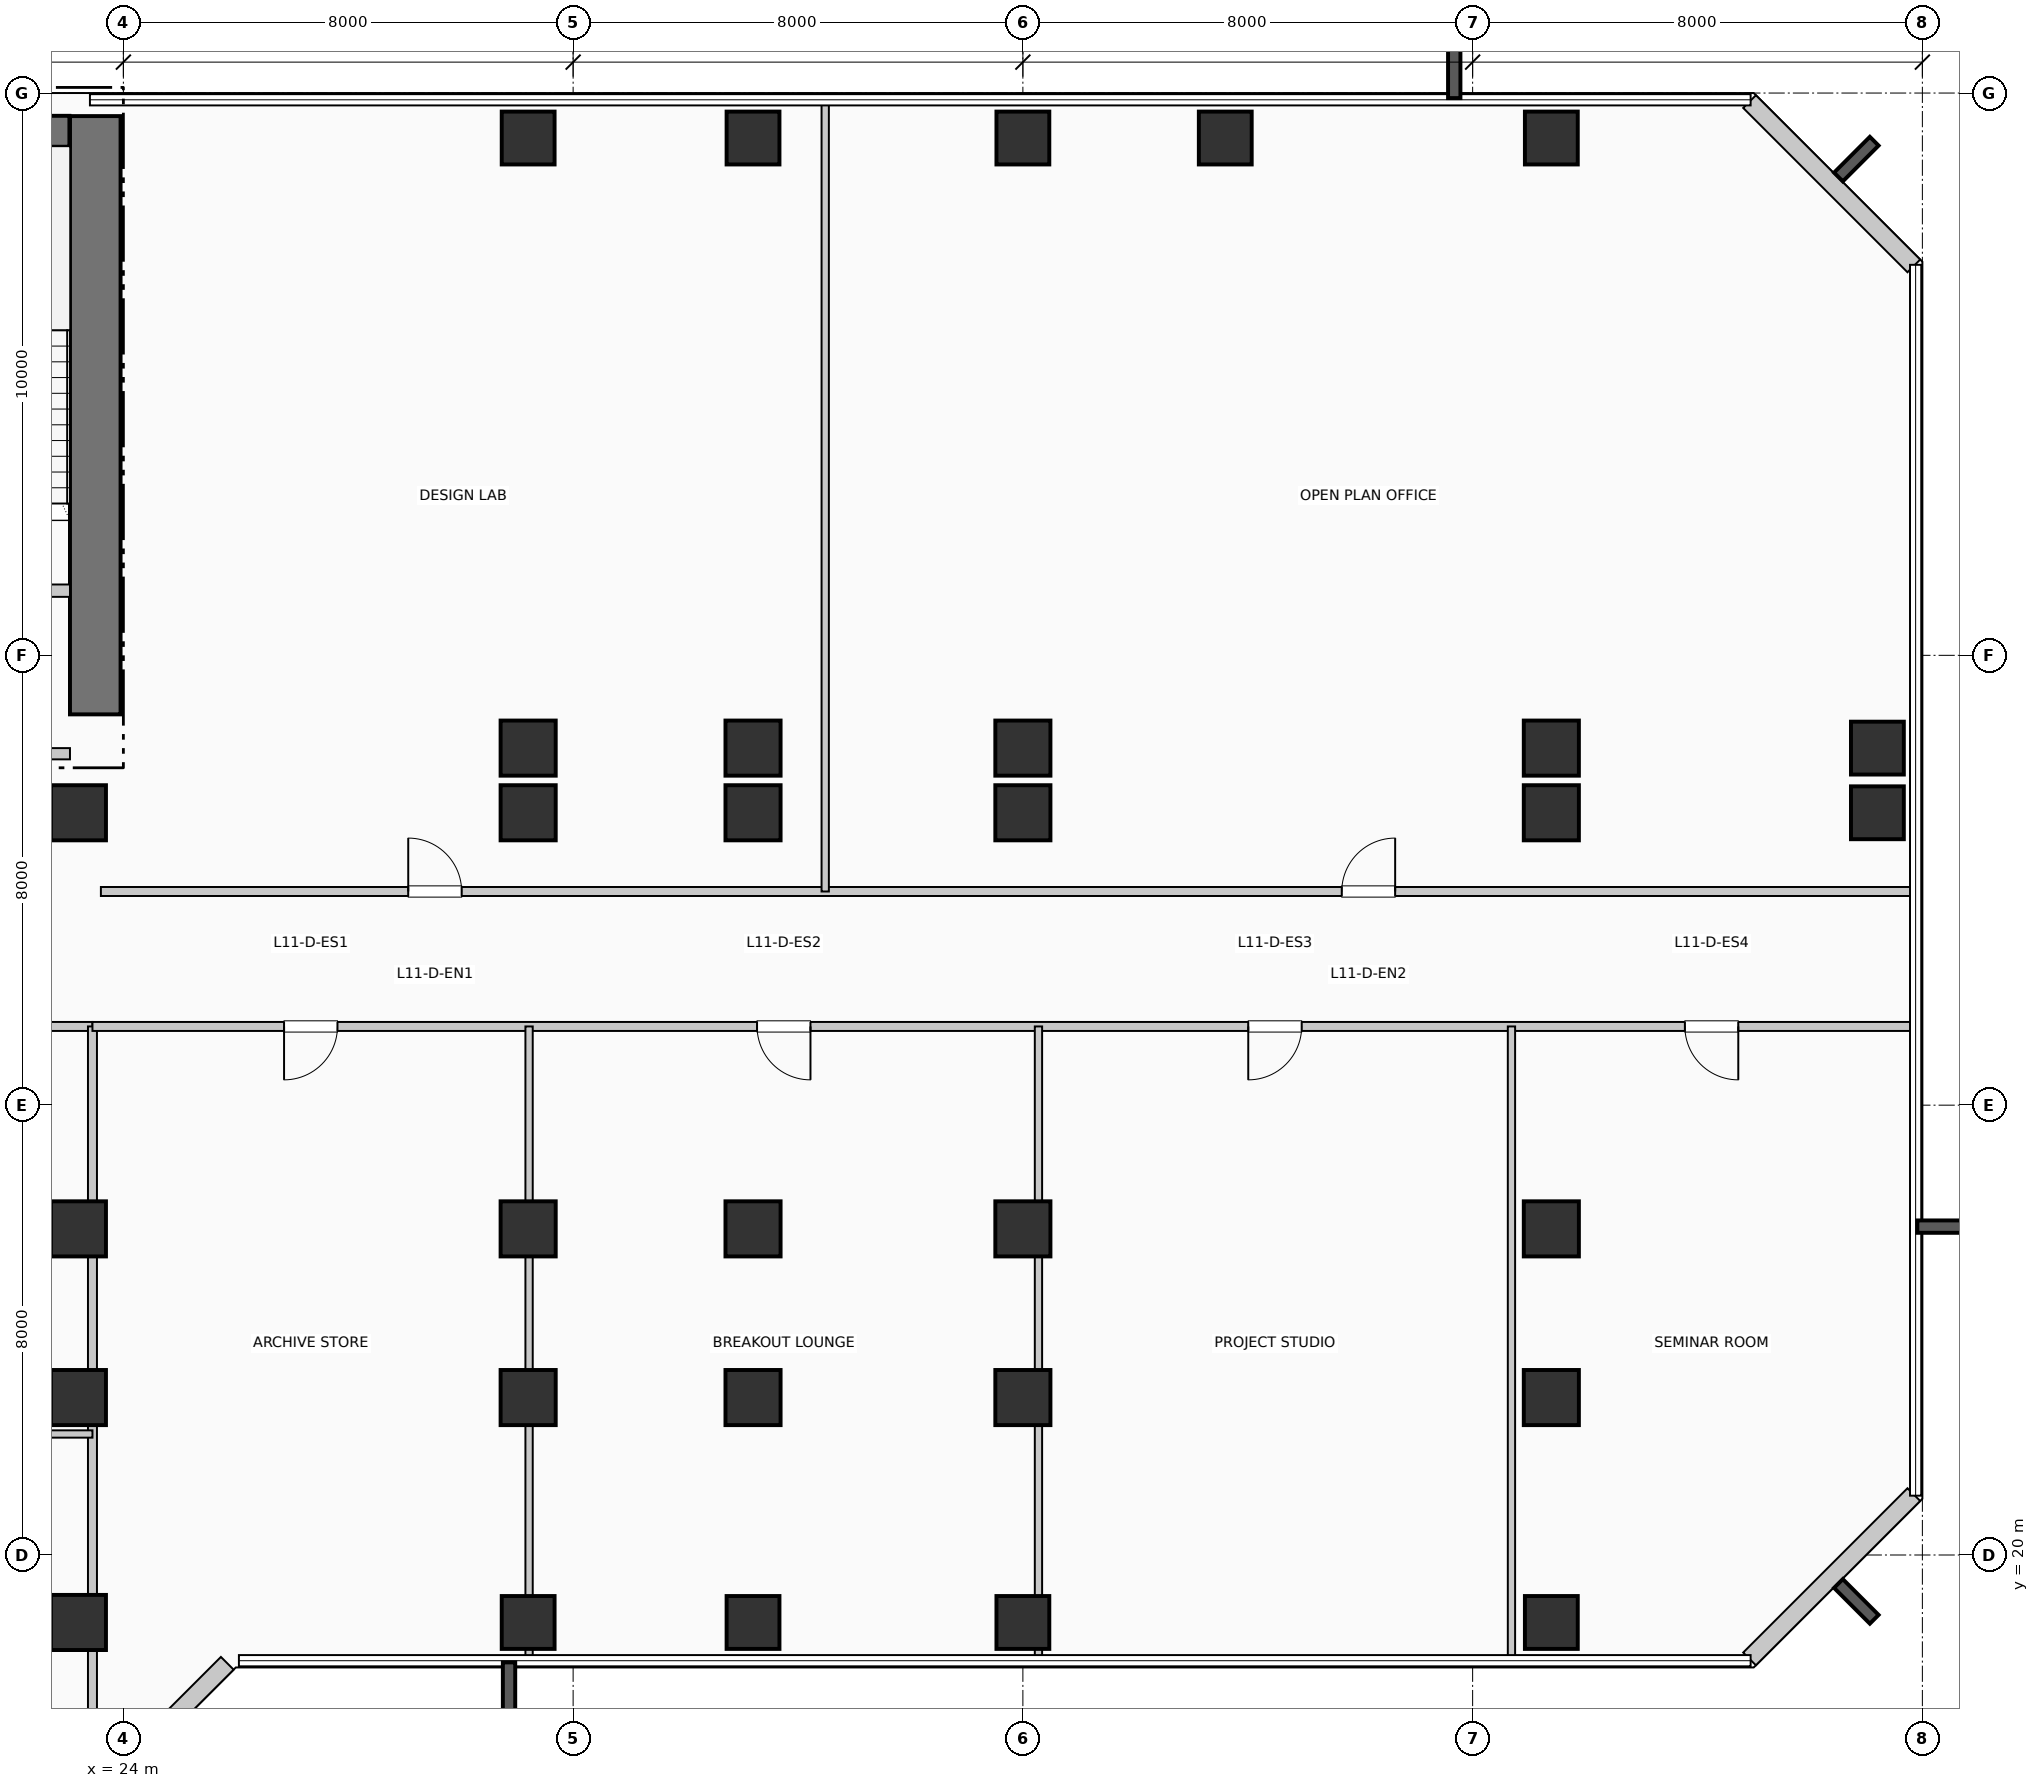
"""IFC4 building model, lengths in metres.
Left out: names, types, materials, properties, quantities, classifications, styles, units other than length and angle.
Written with IfcOpenShell. Run it as: python <this file> out.ifc"""

import sys

from ifc_helpers import new_model, si_unit, direction, frame, frame_2d, origin, origin_2d, place, context, subcontext, project, spatial, rectangle, extrude, element, fill, save


model = new_model("IFC4")
c1 = context("Model", 3, precision=1e-05, world=origin(), true_north=direction((0.0, 1.0)))
c2 = subcontext(c1, "Body", "Model", "MODEL_VIEW")
j1 = project(units=[si_unit("LENGTHUNIT", "METRE"), si_unit("PLANEANGLEUNIT", "RADIAN")], contexts=[c1])
p1 = place(None, origin())
s1 = spatial("IfcSite", under=j1, at=p1, CompositionType="ELEMENT")
p2 = place(p1, origin())
s2 = spatial("IfcBuilding", under=s1, at=p2, CompositionType="ELEMENT")
p3 = place(p2, frame((0.0, 0.0, 50.16)))
s3 = spatial("IfcBuildingStorey", under=s2, at=p3, CompositionType="ELEMENT", Elevation=50.16)
p4 = place(p3, frame((23.5, 34.95, 0.0), z_axis=(0.0, 0.0, 1.0), x_axis=(0.0, 1.0, 0.0)))
e1 = element("IfcWall", 1, at=p4, inside=s3, PredefinedType="SHEAR", context=c2, shape_type="SweptSolid", body=[
    extrude(rectangle(XDim=10.64, YDim=0.9, at=frame_2d((5.32, 0.0))), origin(), (0.0, 0.0, 1.0), 3.96),
])
p5 = place(p3, frame((19.35, 45.32, 0.0), z_axis=(0.0, 0.0, 1.0), x_axis=(1.0, 0.0, 0.0)))
e2 = element("IfcWall", 2, at=p5, inside=s3, PredefinedType="SHEAR", context=c2, shape_type="SweptSolid", body=[
    extrude(rectangle(XDim=3.69, YDim=0.55, at=frame_2d((1.845, 0.0))), origin(), (0.0, 0.0, 1.0), 3.96),
])
p6 = place(p5, frame((1.15, 0.0, 1.05)))
e3 = element("IfcOpeningElement", 3, at=p6, cuts=e2, PredefinedType="OPENING", context=c2, shape_type="SweptSolid", body=[
    extrude(rectangle(XDim=1.4, YDim=1.8, at=frame_2d((0.7, 0.9))), frame((0.0, 0.285, 0.0), z_axis=(0.0, -1.0, 0.0), x_axis=(1.0, 0.0, 0.0)), (0.0, 0.0, 1.0), 0.57),
])
for number, where, z_axis, x_axis in (
    (4, (23.2, 18.8, 0.0), (0.0, 0.0, 1.0), (1.0, 0.0, 0.0)),
    (5, (23.2, 22.8, 0.0), (0.0, 0.0, 1.0), (1.0, 0.0, 0.0)),
    (6, (23.2, 25.8, 0.0), (0.0, 0.0, 1.0), (1.0, 0.0, 0.0)),
    (7, (23.2, 33.2, 0.0), (0.0, 0.0, 1.0), (1.0, 0.0, 0.0)),
):
    element("IfcColumn", number, at=place(p3, frame(where, z_axis=z_axis, x_axis=x_axis)), inside=s3, PredefinedType="COLUMN", context=c2, shape_type="SweptSolid", body=[
        extrude(rectangle(XDim=0.98, YDim=0.98, at=origin_2d()), origin(), (0.0, 0.0, 1.0), 3.96),
    ])
p7 = place(p3, frame((31.2, 18.8, 0.0), z_axis=(0.0, 0.0, 1.0), x_axis=(1.0, 0.0, 0.0)))
e8 = element("IfcColumn", 8, at=p7, inside=s3, PredefinedType="COLUMN", context=c2, shape_type="SweptSolid", body=[
    extrude(rectangle(XDim=0.94, YDim=0.94, at=origin_2d()), origin(), (0.0, 0.0, 1.0), 3.96),
])
for number, where, z_axis, x_axis in (
    (9, (31.2, 22.8, 0.0), (0.0, 0.0, 1.0), (1.0, 0.0, 0.0)),
    (10, (31.2, 25.8, 0.0), (0.0, 0.0, 1.0), (1.0, 0.0, 0.0)),
    (11, (31.2, 33.2, 0.0), (0.0, 0.0, 1.0), (1.0, 0.0, 0.0)),
    (12, (31.2, 34.35, 0.0), (0.0, 0.0, 1.0), (1.0, 0.0, 0.0)),
):
    element("IfcColumn", number, at=place(p3, frame(where, z_axis=z_axis, x_axis=x_axis)), inside=s3, PredefinedType="COLUMN", context=c2, shape_type="SweptSolid", body=[
        extrude(rectangle(XDim=0.98, YDim=0.98, at=origin_2d()), origin(), (0.0, 0.0, 1.0), 3.96),
    ])
for number, where, z_axis, x_axis in (
    (13, (31.2, 45.2, 0.0), (0.0, 0.0, 1.0), (1.0, 0.0, 0.0)),
    (14, (35.2, 18.8, 0.0), (0.0, 0.0, 1.0), (1.0, 0.0, 0.0)),
):
    element("IfcColumn", number, at=place(p3, frame(where, z_axis=z_axis, x_axis=x_axis)), inside=s3, PredefinedType="COLUMN", context=c2, shape_type="SweptSolid", body=[
        extrude(rectangle(XDim=0.94, YDim=0.94, at=origin_2d()), origin(), (0.0, 0.0, 1.0), 3.96),
    ])
for number, where, z_axis, x_axis in (
    (15, (35.2, 22.8, 0.0), (0.0, 0.0, 1.0), (1.0, 0.0, 0.0)),
    (16, (35.2, 25.8, 0.0), (0.0, 0.0, 1.0), (1.0, 0.0, 0.0)),
    (17, (35.2, 33.2, 0.0), (0.0, 0.0, 1.0), (1.0, 0.0, 0.0)),
    (18, (35.2, 34.35, 0.0), (0.0, 0.0, 1.0), (1.0, 0.0, 0.0)),
):
    element("IfcColumn", number, at=place(p3, frame(where, z_axis=z_axis, x_axis=x_axis)), inside=s3, PredefinedType="COLUMN", context=c2, shape_type="SweptSolid", body=[
        extrude(rectangle(XDim=0.98, YDim=0.98, at=origin_2d()), origin(), (0.0, 0.0, 1.0), 3.96),
    ])
for number, where, z_axis, x_axis in (
    (19, (35.2, 45.2, 0.0), (0.0, 0.0, 1.0), (1.0, 0.0, 0.0)),
    (20, (40.0, 18.8, 0.0), (0.0, 0.0, 1.0), (1.0, 0.0, 0.0)),
):
    element("IfcColumn", number, at=place(p3, frame(where, z_axis=z_axis, x_axis=x_axis)), inside=s3, PredefinedType="COLUMN", context=c2, shape_type="SweptSolid", body=[
        extrude(rectangle(XDim=0.94, YDim=0.94, at=origin_2d()), origin(), (0.0, 0.0, 1.0), 3.96),
    ])
for number, where, z_axis, x_axis in (
    (21, (40.0, 22.8, 0.0), (0.0, 0.0, 1.0), (1.0, 0.0, 0.0)),
    (22, (40.0, 25.8, 0.0), (0.0, 0.0, 1.0), (1.0, 0.0, 0.0)),
    (23, (40.0, 33.2, 0.0), (0.0, 0.0, 1.0), (1.0, 0.0, 0.0)),
    (24, (40.0, 34.35, 0.0), (0.0, 0.0, 1.0), (1.0, 0.0, 0.0)),
):
    element("IfcColumn", number, at=place(p3, frame(where, z_axis=z_axis, x_axis=x_axis)), inside=s3, PredefinedType="COLUMN", context=c2, shape_type="SweptSolid", body=[
        extrude(rectangle(XDim=0.98, YDim=0.98, at=origin_2d()), origin(), (0.0, 0.0, 1.0), 3.96),
    ])
for number, where, z_axis, x_axis in (
    (25, (40.0, 45.2, 0.0), (0.0, 0.0, 1.0), (1.0, 0.0, 0.0)),
    (26, (43.6, 45.2, 0.0), (0.0, 0.0, 1.0), (1.0, 0.0, 0.0)),
    (27, (49.4, 18.8, 0.0), (0.0, 0.0, 1.0), (1.0, 0.0, 0.0)),
):
    element("IfcColumn", number, at=place(p3, frame(where, z_axis=z_axis, x_axis=x_axis)), inside=s3, PredefinedType="COLUMN", context=c2, shape_type="SweptSolid", body=[
        extrude(rectangle(XDim=0.94, YDim=0.94, at=origin_2d()), origin(), (0.0, 0.0, 1.0), 3.96),
    ])
for number, where, z_axis, x_axis in (
    (28, (49.4, 22.8, 0.0), (0.0, 0.0, 1.0), (1.0, 0.0, 0.0)),
    (29, (49.4, 25.8, 0.0), (0.0, 0.0, 1.0), (1.0, 0.0, 0.0)),
    (30, (49.4, 33.2, 0.0), (0.0, 0.0, 1.0), (1.0, 0.0, 0.0)),
    (31, (49.4, 34.35, 0.0), (0.0, 0.0, 1.0), (1.0, 0.0, 0.0)),
):
    element("IfcColumn", number, at=place(p3, frame(where, z_axis=z_axis, x_axis=x_axis)), inside=s3, PredefinedType="COLUMN", context=c2, shape_type="SweptSolid", body=[
        extrude(rectangle(XDim=0.98, YDim=0.98, at=origin_2d()), origin(), (0.0, 0.0, 1.0), 3.96),
    ])
for number, where, z_axis, x_axis in (
    (32, (49.4, 45.2, 0.0), (0.0, 0.0, 1.0), (1.0, 0.0, 0.0)),
    (33, (55.2, 33.2, 0.0), (0.0, 0.0, 1.0), (1.0, 0.0, 0.0)),
    (34, (55.2, 34.35, 0.0), (0.0, 0.0, 1.0), (1.0, 0.0, 0.0)),
):
    element("IfcColumn", number, at=place(p3, frame(where, z_axis=z_axis, x_axis=x_axis)), inside=s3, PredefinedType="COLUMN", context=c2, shape_type="SweptSolid", body=[
        extrude(rectangle(XDim=0.94, YDim=0.94, at=origin_2d()), origin(), (0.0, 0.0, 1.0), 3.96),
    ])
p8 = place(p3, frame((23.926, 16.152, 0.0), z_axis=(0.0, 0.0, 1.0), x_axis=(0.707106781187, 0.707106781187, 0.0)))
e35 = element("IfcWall", 35, at=p8, inside=s3, PredefinedType="SOLIDWALL", context=c2, shape_type="SweptSolid", body=[
    extrude(rectangle(XDim=2.718, YDim=0.32, at=frame_2d((1.359, 0.0))), origin(), (0.0, 0.0, 1.0), 3.71),
])
for number, where, z_axis, x_axis in (
    (36, (52.926, 18.152, 0.0), (0.0, 0.0, 1.0), (0.707, 0.707, 0.0)),
    (37, (55.848, 42.926, 0.0), (0.0, 0.0, 1.0), (-0.707, 0.707, 0.0)),
):
    element("IfcWall", number, at=place(p3, frame(where, z_axis=z_axis, x_axis=x_axis)), inside=s3, PredefinedType="SOLIDWALL", context=c2, shape_type="SweptSolid", body=[
        extrude(rectangle(XDim=4.133, YDim=0.32, at=frame_2d((2.066, 0.0))), origin(), (0.0, 0.0, 1.0), 3.71),
    ])
p9 = place(p3, frame((19.9, 37.15, 0.0), z_axis=(0.0, 0.0, 1.0), x_axis=(1.0, 0.0, 0.0)))
e38 = element("IfcWall", 38, at=p9, inside=s3, PredefinedType="PARTITIONING", context=c2, shape_type="SweptSolid", body=[
    extrude(rectangle(XDim=3.15, YDim=0.22, at=frame_2d((1.575, 0.0))), origin(), (0.0, 0.0, 1.0), 3.71),
])
p10 = place(p9, frame((2.05, 0.0, 0.0), z_axis=(0.0, 0.0, 1.0), x_axis=(-1.0, 0.0, 0.0)))
e39 = element("IfcOpeningElement", 39, at=p10, cuts=e38, PredefinedType="OPENING", context=c2, shape_type="SweptSolid", body=[
    extrude(rectangle(XDim=1.05, YDim=2.15, at=frame_2d((0.525, 1.075))), frame((0.0, 0.12, 0.0), z_axis=(0.0, -1.0, 0.0), x_axis=(1.0, 0.0, 0.0)), (0.0, 0.0, 1.0), 0.24),
])
p11 = place(p3, frame((19.8, 34.25, 0.0), z_axis=(0.0, 0.0, 1.0), x_axis=(1.0, 0.0, 0.0)))
e40 = element("IfcWall", 40, at=p11, inside=s3, PredefinedType="PARTITIONING", context=c2, shape_type="SweptSolid", body=[
    extrude(rectangle(XDim=3.25, YDim=0.2, at=frame_2d((1.625, 0.0))), origin(), (0.0, 0.0, 1.0), 3.71),
])
p12 = place(p11, frame((2.15, 0.0, 0.0), z_axis=(0.0, 0.0, 1.0), x_axis=(-1.0, 0.0, 0.0)))
e41 = element("IfcOpeningElement", 41, at=p12, cuts=e40, PredefinedType="OPENING", context=c2, shape_type="SweptSolid", body=[
    extrude(rectangle(XDim=1.1, YDim=2.15, at=frame_2d((0.55, 1.075))), frame((0.0, 0.11, 0.0), z_axis=(0.0, -1.0, 0.0), x_axis=(1.0, 0.0, 0.0)), (0.0, 0.0, 1.0), 0.22),
])
p13 = place(p3, frame((10.9, 29.4, 0.0), z_axis=(0.0, 0.0, 1.0), x_axis=(1.0, 0.0, 0.0)))
e42 = element("IfcWall", 42, at=p13, inside=s3, PredefinedType="PARTITIONING", context=c2, shape_type="SweptSolid", body=[
    extrude(rectangle(XDim=12.55, YDim=0.16, at=frame_2d((6.275, 0.0))), origin(), (0.0, 0.0, 1.0), 3.365),
])
p14 = place(p3, frame((23.45, 1.04, 0.0), z_axis=(0.0, 0.0, 1.0), x_axis=(0.0, 1.0, 0.0)))
e43 = element("IfcWall", 43, at=p14, inside=s3, PredefinedType="PARTITIONING", context=c2, shape_type="SweptSolid", body=[
    extrude(rectangle(XDim=28.36, YDim=0.16, at=frame_2d((14.18, 0.0))), origin(), (0.0, 0.0, 1.0), 2.995),
])
p15 = place(p3, frame((10.9, 22.152, 0.0), z_axis=(0.0, 0.0, 1.0), x_axis=(1.0, 0.0, 0.0)))
e44 = element("IfcWall", 44, at=p15, inside=s3, PredefinedType="PARTITIONING", context=c2, shape_type="SweptSolid", body=[
    extrude(rectangle(XDim=12.55, YDim=0.13, at=frame_2d((6.275, 0.0))), origin(), (0.0, 0.0, 1.0), 3.71),
])
p16 = place(p3, frame((23.45, 29.4, 0.0), z_axis=(0.0, 0.0, 1.0), x_axis=(1.0, 0.0, 0.0)))
e45 = element("IfcWall", 45, at=p16, inside=s3, PredefinedType="PARTITIONING", context=c2, shape_type="SweptSolid", body=[
    extrude(rectangle(XDim=32.36, YDim=0.16, at=frame_2d((16.18, 0.0))), origin(), (0.0, 0.0, 1.0), 3.365),
])
p17 = place(p16, frame((4.358, 0.0, 0.0), z_axis=(0.0, 0.0, 1.0), x_axis=(-1.0, 0.0, 0.0)))
e46 = element("IfcOpeningElement", 46, at=p17, cuts=e45, PredefinedType="OPENING", context=c2, shape_type="SweptSolid", body=[
    extrude(rectangle(XDim=0.95, YDim=2.15, at=frame_2d((0.475, 1.075))), frame((0.0, 0.09, 0.0), z_axis=(0.0, -1.0, 0.0), x_axis=(1.0, 0.0, 0.0)), (0.0, 0.0, 1.0), 0.18),
])
p18 = place(p16, frame((12.772, 0.0, 0.0), z_axis=(0.0, 0.0, 1.0), x_axis=(-1.0, 0.0, 0.0)))
e47 = element("IfcOpeningElement", 47, at=p18, cuts=e45, PredefinedType="OPENING", context=c2, shape_type="SweptSolid", body=[
    extrude(rectangle(XDim=0.95, YDim=2.15, at=frame_2d((0.475, 1.075))), frame((0.0, 0.09, 0.0), z_axis=(0.0, -1.0, 0.0), x_axis=(1.0, 0.0, 0.0)), (0.0, 0.0, 1.0), 0.18),
])
p19 = place(p16, frame((21.509, 0.0, 0.0), z_axis=(0.0, 0.0, 1.0), x_axis=(-1.0, 0.0, 0.0)))
e48 = element("IfcOpeningElement", 48, at=p19, cuts=e45, PredefinedType="OPENING", context=c2, shape_type="SweptSolid", body=[
    extrude(rectangle(XDim=0.95, YDim=2.15, at=frame_2d((0.475, 1.075))), frame((0.0, 0.09, 0.0), z_axis=(0.0, -1.0, 0.0), x_axis=(1.0, 0.0, 0.0)), (0.0, 0.0, 1.0), 0.18),
])
p20 = place(p16, frame((29.275, 0.0, 0.0), z_axis=(0.0, 0.0, 1.0), x_axis=(-1.0, 0.0, 0.0)))
e49 = element("IfcOpeningElement", 49, at=p20, cuts=e45, PredefinedType="OPENING", context=c2, shape_type="SweptSolid", body=[
    extrude(rectangle(XDim=0.95, YDim=2.15, at=frame_2d((0.475, 1.075))), frame((0.0, 0.09, 0.0), z_axis=(0.0, -1.0, 0.0), x_axis=(1.0, 0.0, 0.0)), (0.0, 0.0, 1.0), 0.18),
])
p21 = place(p3, frame((23.6, 31.8, 0.0), z_axis=(0.0, 0.0, 1.0), x_axis=(1.0, 0.0, 0.0)))
e50 = element("IfcWall", 50, at=p21, inside=s3, PredefinedType="PARTITIONING", context=c2, shape_type="SweptSolid", body=[
    extrude(rectangle(XDim=32.21, YDim=0.16, at=frame_2d((16.105, 0.0))), origin(), (0.0, 0.0, 1.0), 3.71),
])
p22 = place(p21, frame((5.467, 0.0, 0.0)))
e51 = element("IfcOpeningElement", 51, at=p22, cuts=e50, PredefinedType="OPENING", context=c2, shape_type="SweptSolid", body=[
    extrude(rectangle(XDim=0.95, YDim=2.15, at=frame_2d((0.475, 1.075))), frame((0.0, 0.09, 0.0), z_axis=(0.0, -1.0, 0.0), x_axis=(1.0, 0.0, 0.0)), (0.0, 0.0, 1.0), 0.18),
])
p23 = place(p21, frame((22.072, 0.0, 0.0)))
e52 = element("IfcOpeningElement", 52, at=p23, cuts=e50, PredefinedType="OPENING", context=c2, shape_type="SweptSolid", body=[
    extrude(rectangle(XDim=0.95, YDim=2.15, at=frame_2d((0.475, 1.075))), frame((0.0, 0.09, 0.0), z_axis=(0.0, -1.0, 0.0), x_axis=(1.0, 0.0, 0.0)), (0.0, 0.0, 1.0), 0.18),
])
for number, where, z_axis, x_axis in (
    (53, (31.216, 18.19, 0.0), (0.0, 0.0, 1.0), (0.0, 1.0, 0.0)),
    (54, (40.277, 18.19, 0.0), (0.0, 0.0, 1.0), (0.0, 1.0, 0.0)),
):
    element("IfcWall", number, at=place(p3, frame(where, z_axis=z_axis, x_axis=x_axis)), inside=s3, PredefinedType="PARTITIONING", context=c2, shape_type="SweptSolid", body=[
        extrude(rectangle(XDim=11.21, YDim=0.13, at=frame_2d((5.605, 0.0))), origin(), (0.0, 0.0, 1.0), 2.995),
    ])
p24 = place(p3, frame((48.691, 18.19, 0.0), z_axis=(0.0, 0.0, 1.0), x_axis=(0.0, 1.0, 0.0)))
e55 = element("IfcWall", 55, at=p24, inside=s3, PredefinedType="PARTITIONING", context=c2, shape_type="SweptSolid", body=[
    extrude(rectangle(XDim=11.21, YDim=0.13, at=frame_2d((5.605, 0.0))), origin(), (0.0, 0.0, 1.0), 3.71),
])
p25 = place(p3, frame((36.484, 31.8, 0.0), z_axis=(0.0, 0.0, 1.0), x_axis=(0.0, 1.0, 0.0)))
e56 = element("IfcWall", 56, at=p25, inside=s3, PredefinedType="PARTITIONING", context=c2, shape_type="SweptSolid", body=[
    extrude(rectangle(XDim=14.01, YDim=0.13, at=frame_2d((7.005, 0.0))), origin(), (0.0, 0.0, 1.0), 3.71),
])
p26 = place(p17, origin())
e57 = element("IfcDoor", 57, at=p26, inside=s3, OperationType="SINGLE_SWING_LEFT", PredefinedType="DOOR", context=c2, shape_type="SweptSolid", body=[
    extrude(rectangle(XDim=0.95, YDim=2.15, at=frame_2d((0.475, 1.075))), frame((0.0, 0.025, 0.0), z_axis=(0.0, -1.0, 0.0), x_axis=(1.0, 0.0, 0.0)), (0.0, 0.0, 1.0), 0.05),
])
fill(e46, e57)
p27 = place(p18, origin())
e58 = element("IfcDoor", 58, at=p27, inside=s3, OperationType="SINGLE_SWING_RIGHT", PredefinedType="DOOR", context=c2, shape_type="SweptSolid", body=[
    extrude(rectangle(XDim=0.95, YDim=2.15, at=frame_2d((0.475, 1.075))), frame((0.0, 0.025, 0.0), z_axis=(0.0, -1.0, 0.0), x_axis=(1.0, 0.0, 0.0)), (0.0, 0.0, 1.0), 0.05),
])
fill(e47, e58)
p28 = place(p19, origin())
e59 = element("IfcDoor", 59, at=p28, inside=s3, OperationType="SINGLE_SWING_LEFT", PredefinedType="DOOR", context=c2, shape_type="SweptSolid", body=[
    extrude(rectangle(XDim=0.95, YDim=2.15, at=frame_2d((0.475, 1.075))), frame((0.0, 0.025, 0.0), z_axis=(0.0, -1.0, 0.0), x_axis=(1.0, 0.0, 0.0)), (0.0, 0.0, 1.0), 0.05),
])
fill(e48, e59)
p29 = place(p20, origin())
e60 = element("IfcDoor", 60, at=p29, inside=s3, OperationType="SINGLE_SWING_RIGHT", PredefinedType="DOOR", context=c2, shape_type="SweptSolid", body=[
    extrude(rectangle(XDim=0.95, YDim=2.15, at=frame_2d((0.475, 1.075))), frame((0.0, 0.025, 0.0), z_axis=(0.0, -1.0, 0.0), x_axis=(1.0, 0.0, 0.0)), (0.0, 0.0, 1.0), 0.05),
])
fill(e49, e60)
p30 = place(p22, origin())
e61 = element("IfcDoor", 61, at=p30, inside=s3, OperationType="SINGLE_SWING_LEFT", PredefinedType="DOOR", context=c2, shape_type="SweptSolid", body=[
    extrude(rectangle(XDim=0.95, YDim=2.15, at=frame_2d((0.475, 1.075))), frame((0.0, 0.025, 0.0), z_axis=(0.0, -1.0, 0.0), x_axis=(1.0, 0.0, 0.0)), (0.0, 0.0, 1.0), 0.05),
])
fill(e51, e61)
p31 = place(p23, origin())
e62 = element("IfcDoor", 62, at=p31, inside=s3, OperationType="SINGLE_SWING_RIGHT", PredefinedType="DOOR", context=c2, shape_type="SweptSolid", body=[
    extrude(rectangle(XDim=0.95, YDim=2.15, at=frame_2d((0.475, 1.075))), frame((0.0, 0.025, 0.0), z_axis=(0.0, -1.0, 0.0), x_axis=(1.0, 0.0, 0.0)), (0.0, 0.0, 1.0), 0.05),
])
fill(e52, e62)
save(model, sys.argv[1])
